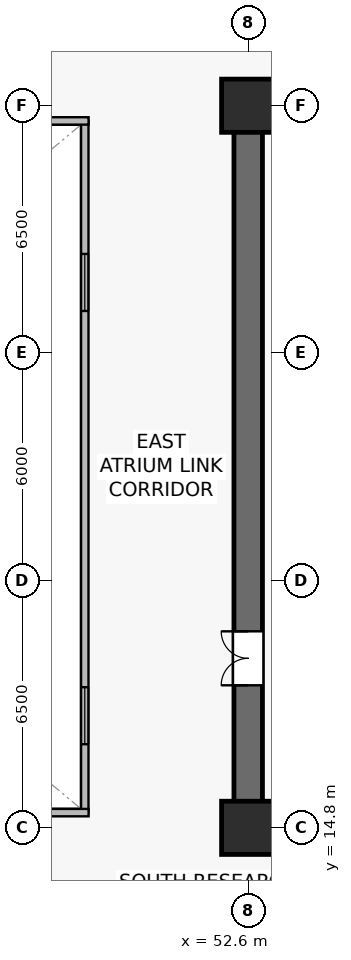
"""IFC4 building model, lengths in metres.
Left out: names, types, materials, properties, quantities, classifications, styles, units other than length and angle.
Written with IfcOpenShell. Run it as: python <this file> out.ifc"""

import sys

from ifc_helpers import new_model, si_unit, direction, frame, frame_2d, origin, origin_2d, place, context, subcontext, project, spatial, rectangle, extrude, source, transform, mapped, element, fill, save


model = new_model("IFC4")
c1 = context("Model", 3, precision=1e-05, world=origin(), true_north=direction((0.0, 1.0)))
c2 = subcontext(c1, "Body", "Model", "MODEL_VIEW")
j1 = project(units=[si_unit("LENGTHUNIT", "METRE"), si_unit("PLANEANGLEUNIT", "RADIAN")], contexts=[c1])
p1 = place(None, origin())
s1 = spatial("IfcSite", under=j1, at=p1, CompositionType="ELEMENT")
p2 = place(p1, origin())
s2 = spatial("IfcBuilding", under=s1, at=p2, CompositionType="ELEMENT")
p3 = place(p2, frame((0.0, 0.0, 33.4)))
s3 = spatial("IfcBuildingStorey", under=s2, at=p3, CompositionType="ELEMENT", Elevation=33.4)
p4 = place(p3, frame((52.225, 14.8, 0.0), z_axis=(0.0, 0.0, 1.0), x_axis=(1.0, 0.0, 0.0)))
e1 = element("IfcWall", 1, at=p4, inside=s3, PredefinedType="SHEAR", context=c2, shape_type="SweptSolid", body=[
    extrude(rectangle(XDim=15.55, YDim=0.75, at=frame_2d((7.775, 0.0))), origin(), (0.0, 0.0, 1.0), 3.78),
])
p5 = place(p3, frame((52.225, 33.8, 0.0), z_axis=(0.0, 0.0, 1.0), x_axis=(1.0, 0.0, 0.0)))
e2 = element("IfcWall", 2, at=p5, inside=s3, PredefinedType="SHEAR", context=c2, shape_type="SweptSolid", body=[
    extrude(rectangle(XDim=15.55, YDim=0.75, at=frame_2d((7.775, 0.0))), origin(), (0.0, 0.0, 1.0), 3.78),
])
p6 = place(p5, frame((9.3, 0.0, 0.0)))
e3 = element("IfcOpeningElement", 3, at=p6, cuts=e2, PredefinedType="OPENING", context=c2, shape_type="SweptSolid", body=[
    extrude(rectangle(XDim=0.95, YDim=2.15, at=frame_2d((0.475, 1.075))), frame((0.0, 0.385, 0.0), z_axis=(0.0, -1.0, 0.0), x_axis=(1.0, 0.0, 0.0)), (0.0, 0.0, 1.0), 0.77),
])
p7 = place(p5, frame((6.785, 0.0, 0.0)))
e4 = element("IfcOpeningElement", 4, at=p7, cuts=e2, PredefinedType="OPENING", context=c2, shape_type="SweptSolid", body=[
    extrude(rectangle(XDim=0.95, YDim=2.15, at=frame_2d((0.475, 1.075))), frame((0.0, 0.385, 0.0), z_axis=(0.0, -1.0, 0.0), x_axis=(1.0, 0.0, 0.0)), (0.0, 0.0, 1.0), 0.77),
])
p8 = place(p5, frame((4.235, 0.0, 0.0)))
e5 = element("IfcOpeningElement", 5, at=p8, cuts=e2, PredefinedType="OPENING", context=c2, shape_type="SweptSolid", body=[
    extrude(rectangle(XDim=0.95, YDim=2.15, at=frame_2d((0.475, 1.075))), frame((0.0, 0.385, 0.0), z_axis=(0.0, -1.0, 0.0), x_axis=(1.0, 0.0, 0.0)), (0.0, 0.0, 1.0), 0.77),
])
p9 = place(p5, frame((1.685, 0.0, 0.0)))
e6 = element("IfcOpeningElement", 6, at=p9, cuts=e2, PredefinedType="OPENING", context=c2, shape_type="SweptSolid", body=[
    extrude(rectangle(XDim=0.95, YDim=2.15, at=frame_2d((0.475, 1.075))), frame((0.0, 0.385, 0.0), z_axis=(0.0, -1.0, 0.0), x_axis=(1.0, 0.0, 0.0)), (0.0, 0.0, 1.0), 0.77),
])
p10 = place(p3, frame((52.6, 15.175, 0.0), z_axis=(0.0, 0.0, 1.0), x_axis=(0.0, 1.0, 0.0)))
e7 = element("IfcWall", 7, at=p10, inside=s3, PredefinedType="SHEAR", context=c2, shape_type="SweptSolid", body=[
    extrude(rectangle(XDim=18.25, YDim=0.75, at=frame_2d((9.125, 0.0))), origin(), (0.0, 0.0, 1.0), 3.78),
])
p11 = place(p10, frame((3.375, 0.0, 0.0)))
e8 = element("IfcOpeningElement", 8, at=p11, cuts=e7, PredefinedType="OPENING", context=c2, shape_type="SweptSolid", body=[
    extrude(rectangle(XDim=1.42, YDim=2.2, at=frame_2d((0.71, 1.1))), frame((0.0, 0.385, 0.0), z_axis=(0.0, -1.0, 0.0), x_axis=(1.0, 0.0, 0.0)), (0.0, 0.0, 1.0), 0.77),
])
m1 = source(origin(), c2, "Body", "SweptSolid", [
    extrude(rectangle(XDim=1.4, YDim=1.4, at=origin_2d()), origin(), (0.0, 0.0, 1.0), 4.1),
])
for number, where, z_axis, x_axis in (
    (9, (52.6, 14.8, 0.0), (0.0, 0.0, 1.0), (1.0, 0.0, 0.0)),
    (10, (52.6, 33.8, 0.0), (0.0, 0.0, 1.0), (1.0, 0.0, 0.0)),
):
    element("IfcColumn", number, at=place(p3, frame(where, z_axis=z_axis, x_axis=x_axis)), inside=s3, PredefinedType="COLUMN", context=c2, shape_type="MappedRepresentation", body=[
        mapped(m1, transform((0.0, 0.0, 0.0), scale=1.0)),
    ])
p12 = place(p3, frame((48.3, 15.2, 0.0), z_axis=(0.0, 0.0, 1.0), x_axis=(0.0, 1.0, 0.0)))
e11 = element("IfcWall", 11, at=p12, inside=s3, PredefinedType="SOLIDWALL", context=c2, shape_type="SweptSolid", body=[
    extrude(rectangle(XDim=18.2, YDim=0.195, at=frame_2d((9.1, 0.0))), origin(), (0.0, 0.0, 1.0), 3.78),
])
p13 = place(p12, frame((1.8, 0.0, 0.9)))
e12 = element("IfcOpeningElement", 12, at=p13, cuts=e11, PredefinedType="OPENING", context=c2, shape_type="SweptSolid", body=[
    extrude(rectangle(XDim=1.5, YDim=1.4, at=frame_2d((0.75, 0.7))), frame((0.0, 0.107, 0.0), z_axis=(0.0, -1.0, 0.0), x_axis=(1.0, 0.0, 0.0)), (0.0, 0.0, 1.0), 0.215),
])
p14 = place(p12, frame((13.2, 0.0, 0.9)))
e13 = element("IfcOpeningElement", 13, at=p14, cuts=e11, PredefinedType="OPENING", context=c2, shape_type="SweptSolid", body=[
    extrude(rectangle(XDim=1.5, YDim=1.4, at=frame_2d((0.75, 0.7))), frame((0.0, 0.107, 0.0), z_axis=(0.0, -1.0, 0.0), x_axis=(1.0, 0.0, 0.0)), (0.0, 0.0, 1.0), 0.215),
])
for number, where, z_axis, x_axis in (
    (14, (26.4, 15.2, 0.0), (0.0, 0.0, 1.0), (1.0, 0.0, 0.0)),
    (15, (26.4, 33.4, 0.0), (0.0, 0.0, 1.0), (1.0, 0.0, 0.0)),
):
    element("IfcWall", number, at=place(p3, frame(where, z_axis=z_axis, x_axis=x_axis)), inside=s3, PredefinedType="SOLIDWALL", context=c2, shape_type="SweptSolid", body=[
        extrude(rectangle(XDim=22.0, YDim=0.195, at=frame_2d((11.0, 0.0))), origin(), (0.0, 0.0, 1.0), 3.78),
    ])
m2 = source(origin(), c2, "Body", "SweptSolid", [
    extrude(rectangle(XDim=1.5, YDim=1.4, at=frame_2d((0.75, 0.7))), frame((0.0, 0.03, 0.0), z_axis=(0.0, -1.0, 0.0), x_axis=(1.0, 0.0, 0.0)), (0.0, 0.0, 1.0), 0.06),
])
p15 = place(p13, origin())
e16 = element("IfcWindow", 16, at=p15, inside=s3, PartitioningType="SINGLE_PANEL", PredefinedType="WINDOW", context=c2, shape_type="MappedRepresentation", body=[
    mapped(m2, transform((0.0, 0.0, 0.0), scale=1.0)),
])
fill(e12, e16)
p16 = place(p14, origin())
e17 = element("IfcWindow", 17, at=p16, inside=s3, PartitioningType="SINGLE_PANEL", PredefinedType="WINDOW", context=c2, shape_type="MappedRepresentation", body=[
    mapped(m2, transform((0.0, 0.0, 0.0), scale=1.0)),
])
fill(e13, e17)
m3 = source(origin(), c2, "Body", "SweptSolid", [
    extrude(rectangle(XDim=1.42, YDim=2.2, at=frame_2d((0.71, 1.1))), frame((0.0, 0.025, 0.0), z_axis=(0.0, -1.0, 0.0), x_axis=(1.0, 0.0, 0.0)), (0.0, 0.0, 1.0), 0.05),
])
p17 = place(p11, origin())
e18 = element("IfcDoor", 18, at=p17, inside=s3, OperationType="DOUBLE_DOOR_SINGLE_SWING", PredefinedType="DOOR", context=c2, shape_type="MappedRepresentation", body=[
    mapped(m3, transform((0.0, 0.0, 0.0), scale=1.0)),
])
fill(e8, e18)
save(model, sys.argv[1])
